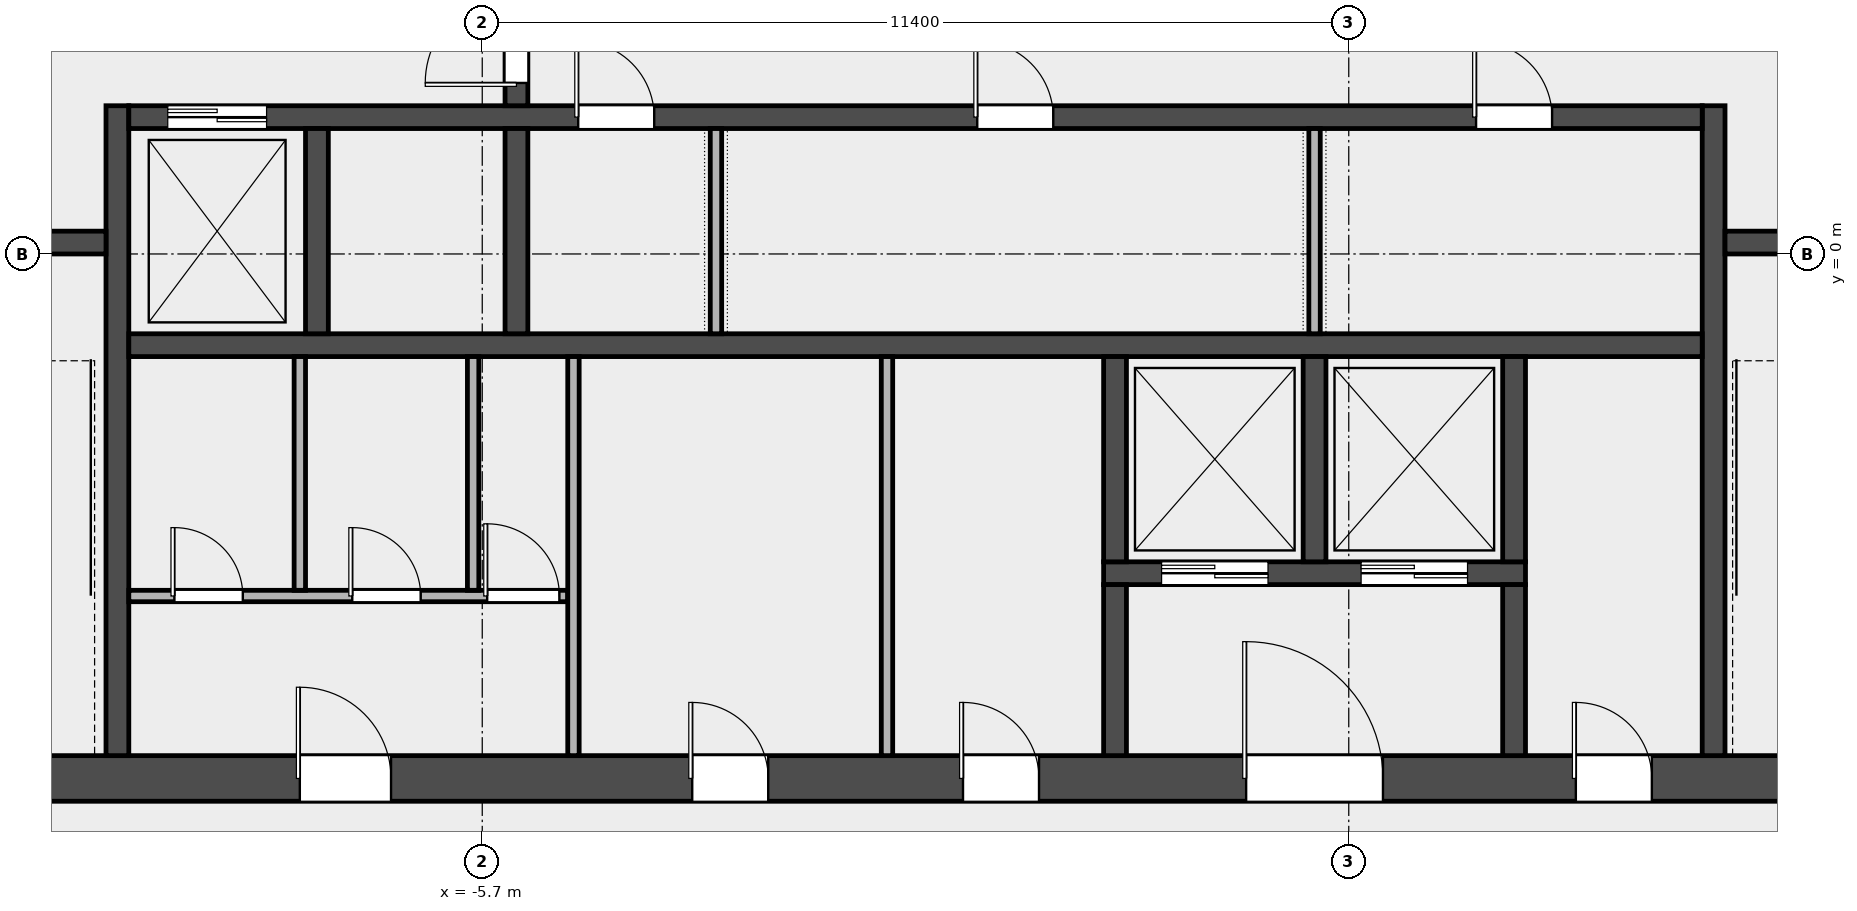
"""IFC4 building model, lengths in metres.
Left out: names, types, materials, properties, quantities, classifications, styles, units other than length and angle.
Written with IfcOpenShell. Run it as: python <this file> out.ifc"""

import sys

from ifc_helpers import new_model, si_unit, direction, frame, frame_2d, origin, place, context, subcontext, project, spatial, rectangle, extrude, element, fill, save


model = new_model("IFC4")
c1 = context("Model", 3, precision=1e-05, world=origin(), true_north=direction((0.0, 1.0)))
c2 = subcontext(c1, "Body", "Model", "MODEL_VIEW")
j1 = project(units=[si_unit("LENGTHUNIT", "METRE"), si_unit("PLANEANGLEUNIT", "RADIAN")], contexts=[c1])
p1 = place(None, origin())
s1 = spatial("IfcSite", under=j1, at=p1, CompositionType="ELEMENT")
p2 = place(p1, origin())
s2 = spatial("IfcBuilding", under=s1, at=p2, CompositionType="ELEMENT")
p3 = place(p2, frame((0.0, 0.0, 283.4)))
s3 = spatial("IfcBuildingStorey", under=s2, at=p3, CompositionType="ELEMENT", Elevation=283.4)
p4 = place(p3, frame((-14.4, -6.9, 0.0), z_axis=(0.0, 0.0, 1.0), x_axis=(1.0, 0.0, 0.0)))
e1 = element("IfcWall", 1, at=p4, inside=s3, PredefinedType="SHEAR", context=c2, shape_type="SweptSolid", body=[
    extrude(rectangle(XDim=28.8, YDim=0.6, at=frame_2d((14.4, 0.0))), origin(), (0.0, 0.0, 1.0), 3.7),
])
p5 = place(p4, frame((6.3, 0.0, 0.0)))
e2 = element("IfcOpeningElement", 2, at=p5, cuts=e1, PredefinedType="OPENING", context=c2, shape_type="SweptSolid", body=[
    extrude(rectangle(XDim=1.2, YDim=2.1, at=frame_2d((0.6, 1.05))), frame((0.0, 0.312, 0.0), z_axis=(0.0, -1.0, 0.0), x_axis=(1.0, 0.0, 0.0)), (0.0, 0.0, 1.0), 0.624),
])
p6 = place(p4, frame((11.462, 0.0, 0.0)))
e3 = element("IfcOpeningElement", 3, at=p6, cuts=e1, PredefinedType="OPENING", context=c2, shape_type="SweptSolid", body=[
    extrude(rectangle(XDim=1.0, YDim=2.1, at=frame_2d((0.5, 1.05))), frame((0.0, 0.312, 0.0), z_axis=(0.0, -1.0, 0.0), x_axis=(1.0, 0.0, 0.0)), (0.0, 0.0, 1.0), 0.624),
])
p7 = place(p4, frame((15.025, 0.0, 0.0)))
e4 = element("IfcOpeningElement", 4, at=p7, cuts=e1, PredefinedType="OPENING", context=c2, shape_type="SweptSolid", body=[
    extrude(rectangle(XDim=1.0, YDim=2.1, at=frame_2d((0.5, 1.05))), frame((0.0, 0.312, 0.0), z_axis=(0.0, -1.0, 0.0), x_axis=(1.0, 0.0, 0.0)), (0.0, 0.0, 1.0), 0.624),
])
p8 = place(p4, frame((18.75, 0.0, 0.0)))
e5 = element("IfcOpeningElement", 5, at=p8, cuts=e1, PredefinedType="OPENING", context=c2, shape_type="SweptSolid", body=[
    extrude(rectangle(XDim=1.8, YDim=2.1, at=frame_2d((0.9, 1.05))), frame((0.0, 0.312, 0.0), z_axis=(0.0, -1.0, 0.0), x_axis=(1.0, 0.0, 0.0)), (0.0, 0.0, 1.0), 0.624),
])
p9 = place(p4, frame((23.087, 0.0, 0.0)))
e6 = element("IfcOpeningElement", 6, at=p9, cuts=e1, PredefinedType="OPENING", context=c2, shape_type="SweptSolid", body=[
    extrude(rectangle(XDim=1.0, YDim=2.1, at=frame_2d((0.5, 1.05))), frame((0.0, 0.312, 0.0), z_axis=(0.0, -1.0, 0.0), x_axis=(1.0, 0.0, 0.0)), (0.0, 0.0, 1.0), 0.624),
])
for number, where, z_axis, x_axis in (
    (7, (-10.5, -6.6, 0.0), (0.0, 0.0, 1.0), (0.0, 1.0, 0.0)),
    (8, (10.5, -6.6, 0.0), (0.0, 0.0, 1.0), (0.0, 1.0, 0.0)),
):
    element("IfcWall", number, at=place(p3, frame(where, z_axis=z_axis, x_axis=x_axis)), inside=s3, PredefinedType="SHEAR", context=c2, shape_type="SweptSolid", body=[
        extrude(rectangle(XDim=8.55, YDim=0.3, at=frame_2d((4.275, 0.0))), origin(), (0.0, 0.0, 1.0), 3.7),
    ])
p10 = place(p3, frame((-13.8, 0.15, 0.0), z_axis=(0.0, 0.0, 1.0), x_axis=(1.0, 0.0, 0.0)))
e9 = element("IfcWall", 9, at=p10, inside=s3, PredefinedType="SOLIDWALL", context=c2, shape_type="SweptSolid", body=[
    extrude(rectangle(XDim=3.15, YDim=0.3, at=frame_2d((1.575, 0.0))), origin(), (0.0, 0.0, 1.0), 3.7),
])
p11 = place(p10, frame((0.975, 0.0, 0.0)))
e10 = element("IfcOpeningElement", 10, at=p11, cuts=e9, PredefinedType="OPENING", context=c2, shape_type="SweptSolid", body=[
    extrude(rectangle(XDim=1.1, YDim=2.1, at=frame_2d((0.55, 1.05))), frame((0.0, 0.162, 0.0), z_axis=(0.0, -1.0, 0.0), x_axis=(1.0, 0.0, 0.0)), (0.0, 0.0, 1.0), 0.324),
])
p12 = place(p3, frame((10.65, 0.15, 0.0), z_axis=(0.0, 0.0, 1.0), x_axis=(1.0, 0.0, 0.0)))
e11 = element("IfcWall", 11, at=p12, inside=s3, PredefinedType="SOLIDWALL", context=c2, shape_type="SweptSolid", body=[
    extrude(rectangle(XDim=3.15, YDim=0.3, at=frame_2d((1.575, 0.0))), origin(), (0.0, 0.0, 1.0), 3.7),
])
p13 = place(p12, frame((1.025, 0.0, 0.0)))
e12 = element("IfcOpeningElement", 12, at=p13, cuts=e11, PredefinedType="OPENING", context=c2, shape_type="SweptSolid", body=[
    extrude(rectangle(XDim=1.1, YDim=2.1, at=frame_2d((0.55, 1.05))), frame((0.0, 0.162, 0.0), z_axis=(0.0, -1.0, 0.0), x_axis=(1.0, 0.0, 0.0)), (0.0, 0.0, 1.0), 0.324),
])
p14 = place(p3, frame((-10.35, -1.2, 0.0), z_axis=(0.0, 0.0, 1.0), x_axis=(1.0, 0.0, 0.0)))
e13 = element("IfcWall", 13, at=p14, inside=s3, PredefinedType="SOLIDWALL", context=c2, shape_type="SweptSolid", body=[
    extrude(rectangle(XDim=20.7, YDim=0.3, at=frame_2d((10.35, 0.0))), origin(), (0.0, 0.0, 1.0), 3.7),
])
p15 = place(p3, frame((-10.35, 1.8, 0.0), z_axis=(0.0, 0.0, 1.0), x_axis=(1.0, 0.0, 0.0)))
e14 = element("IfcWall", 14, at=p15, inside=s3, PredefinedType="SOLIDWALL", context=c2, shape_type="SweptSolid", body=[
    extrude(rectangle(XDim=20.7, YDim=0.3, at=frame_2d((10.35, 0.0))), origin(), (0.0, 0.0, 1.0), 3.7),
])
p16 = place(p15, frame((0.512, 0.0, 0.0)))
e15 = element("IfcOpeningElement", 15, at=p16, cuts=e14, PredefinedType="OPENING", context=c2, shape_type="SweptSolid", body=[
    extrude(rectangle(XDim=1.3, YDim=2.1, at=frame_2d((0.65, 1.05))), frame((0.0, 0.162, 0.0), z_axis=(0.0, -1.0, 0.0), x_axis=(1.0, 0.0, 0.0)), (0.0, 0.0, 1.0), 0.324),
])
p17 = place(p15, frame((5.913, 0.0, 0.0)))
e16 = element("IfcOpeningElement", 16, at=p17, cuts=e14, PredefinedType="OPENING", context=c2, shape_type="SweptSolid", body=[
    extrude(rectangle(XDim=1.0, YDim=2.1, at=frame_2d((0.5, 1.05))), frame((0.0, 0.162, 0.0), z_axis=(0.0, -1.0, 0.0), x_axis=(1.0, 0.0, 0.0)), (0.0, 0.0, 1.0), 0.324),
])
p18 = place(p15, frame((11.163, 0.0, 0.0)))
e17 = element("IfcOpeningElement", 17, at=p18, cuts=e14, PredefinedType="OPENING", context=c2, shape_type="SweptSolid", body=[
    extrude(rectangle(XDim=1.0, YDim=2.1, at=frame_2d((0.5, 1.05))), frame((0.0, 0.162, 0.0), z_axis=(0.0, -1.0, 0.0), x_axis=(1.0, 0.0, 0.0)), (0.0, 0.0, 1.0), 0.324),
])
p19 = place(p15, frame((17.725, 0.0, 0.0)))
e18 = element("IfcOpeningElement", 18, at=p19, cuts=e14, PredefinedType="OPENING", context=c2, shape_type="SweptSolid", body=[
    extrude(rectangle(XDim=1.0, YDim=2.1, at=frame_2d((0.5, 1.05))), frame((0.0, 0.162, 0.0), z_axis=(0.0, -1.0, 0.0), x_axis=(1.0, 0.0, 0.0)), (0.0, 0.0, 1.0), 0.324),
])
for number, where, z_axis, x_axis in (
    (19, (-7.875, -1.05, 0.0), (0.0, 0.0, 1.0), (0.0, 1.0, 0.0)),
    (20, (-5.25, -1.05, 0.0), (0.0, 0.0, 1.0), (0.0, 1.0, 0.0)),
):
    element("IfcWall", number, at=place(p3, frame(where, z_axis=z_axis, x_axis=x_axis)), inside=s3, PredefinedType="SOLIDWALL", context=c2, shape_type="SweptSolid", body=[
        extrude(rectangle(XDim=2.7, YDim=0.3, at=frame_2d((1.35, 0.0))), origin(), (0.0, 0.0, 1.0), 3.7),
    ])
p20 = place(p3, frame((-5.25, 1.95, 0.0), z_axis=(0.0, 0.0, 1.0), x_axis=(0.0, 1.0, 0.0)))
e21 = element("IfcWall", 21, at=p20, inside=s3, PredefinedType="SOLIDWALL", context=c2, shape_type="SweptSolid", body=[
    extrude(rectangle(XDim=3.3, YDim=0.3, at=frame_2d((1.65, 0.0))), origin(), (0.0, 0.0, 1.0), 3.7),
])
p21 = place(p20, frame((0.3, 0.0, 0.0)))
e22 = element("IfcOpeningElement", 22, at=p21, cuts=e21, PredefinedType="OPENING", context=c2, shape_type="SweptSolid", body=[
    extrude(rectangle(XDim=1.2, YDim=2.1, at=frame_2d((0.6, 1.05))), frame((0.0, 0.162, 0.0), z_axis=(0.0, -1.0, 0.0), x_axis=(1.0, 0.0, 0.0)), (0.0, 0.0, 1.0), 0.324),
])
p22 = place(p20, frame((1.8, 0.0, 0.0)))
e23 = element("IfcOpeningElement", 23, at=p22, cuts=e21, PredefinedType="OPENING", context=c2, shape_type="SweptSolid", body=[
    extrude(rectangle(XDim=1.2, YDim=2.1, at=frame_2d((0.6, 1.05))), frame((0.0, 0.162, 0.0), z_axis=(0.0, -1.0, 0.0), x_axis=(1.0, 0.0, 0.0)), (0.0, 0.0, 1.0), 0.324),
])
p23 = place(p3, frame((2.475, -4.2, 0.0), z_axis=(0.0, 0.0, 1.0), x_axis=(1.0, 0.0, 0.0)))
e24 = element("IfcWall", 24, at=p23, inside=s3, PredefinedType="SOLIDWALL", context=c2, shape_type="SweptSolid", body=[
    extrude(rectangle(XDim=5.55, YDim=0.3, at=frame_2d((2.775, 0.0))), origin(), (0.0, 0.0, 1.0), 3.7),
])
p24 = place(p23, frame((0.762, 0.0, 0.0)))
e25 = element("IfcOpeningElement", 25, at=p24, cuts=e24, PredefinedType="OPENING", context=c2, shape_type="SweptSolid", body=[
    extrude(rectangle(XDim=1.4, YDim=2.1, at=frame_2d((0.7, 1.05))), frame((0.0, 0.162, 0.0), z_axis=(0.0, -1.0, 0.0), x_axis=(1.0, 0.0, 0.0)), (0.0, 0.0, 1.0), 0.324),
])
p25 = place(p23, frame((3.387, 0.0, 0.0)))
e26 = element("IfcOpeningElement", 26, at=p25, cuts=e24, PredefinedType="OPENING", context=c2, shape_type="SweptSolid", body=[
    extrude(rectangle(XDim=1.4, YDim=2.1, at=frame_2d((0.7, 1.05))), frame((0.0, 0.162, 0.0), z_axis=(0.0, -1.0, 0.0), x_axis=(1.0, 0.0, 0.0)), (0.0, 0.0, 1.0), 0.324),
])
p26 = place(p3, frame((2.625, -4.05, 0.0), z_axis=(0.0, 0.0, 1.0), x_axis=(0.0, 1.0, 0.0)))
e27 = element("IfcWall", 27, at=p26, inside=s3, PredefinedType="SOLIDWALL", context=c2, shape_type="SweptSolid", body=[
    extrude(rectangle(XDim=2.7, YDim=0.3, at=frame_2d((1.35, 0.0))), origin(), (0.0, 0.0, 1.0), 3.7),
])
p27 = place(p3, frame((2.625, -6.6, 0.0), z_axis=(0.0, 0.0, 1.0), x_axis=(0.0, 1.0, 0.0)))
e28 = element("IfcWall", 28, at=p27, inside=s3, PredefinedType="SOLIDWALL", context=c2, shape_type="SweptSolid", body=[
    extrude(rectangle(XDim=2.25, YDim=0.3, at=frame_2d((1.125, 0.0))), origin(), (0.0, 0.0, 1.0), 3.7),
])
for number, where, z_axis, x_axis in (
    (29, (5.25, -4.05, 0.0), (0.0, 0.0, 1.0), (0.0, 1.0, 0.0)),
    (30, (7.875, -4.05, 0.0), (0.0, 0.0, 1.0), (0.0, 1.0, 0.0)),
):
    element("IfcWall", number, at=place(p3, frame(where, z_axis=z_axis, x_axis=x_axis)), inside=s3, PredefinedType="SOLIDWALL", context=c2, shape_type="SweptSolid", body=[
        extrude(rectangle(XDim=2.7, YDim=0.3, at=frame_2d((1.35, 0.0))), origin(), (0.0, 0.0, 1.0), 3.7),
    ])
p28 = place(p3, frame((7.875, -6.6, 0.0), z_axis=(0.0, 0.0, 1.0), x_axis=(0.0, 1.0, 0.0)))
e31 = element("IfcWall", 31, at=p28, inside=s3, PredefinedType="SOLIDWALL", context=c2, shape_type="SweptSolid", body=[
    extrude(rectangle(XDim=2.25, YDim=0.3, at=frame_2d((1.125, 0.0))), origin(), (0.0, 0.0, 1.0), 3.7),
])
p29 = place(p3, frame((-10.35, -4.5, 0.0), z_axis=(0.0, 0.0, 1.0), x_axis=(1.0, 0.0, 0.0)))
e32 = element("IfcWall", 32, at=p29, inside=s3, PredefinedType="PARTITIONING", context=c2, shape_type="SweptSolid", body=[
    extrude(rectangle(XDim=5.775, YDim=0.15, at=frame_2d((2.888, 0.0))), origin(), (0.0, 0.0, 1.0), 3.7),
])
p30 = place(p29, frame((0.6, 0.0, 0.0)))
e33 = element("IfcOpeningElement", 33, at=p30, cuts=e32, PredefinedType="OPENING", context=c2, shape_type="SweptSolid", body=[
    extrude(rectangle(XDim=0.9, YDim=2.1, at=frame_2d((0.45, 1.05))), frame((0.0, 0.087, 0.0), z_axis=(0.0, -1.0, 0.0), x_axis=(1.0, 0.0, 0.0)), (0.0, 0.0, 1.0), 0.174),
])
p31 = place(p29, frame((2.94, 0.0, 0.0)))
e34 = element("IfcOpeningElement", 34, at=p31, cuts=e32, PredefinedType="OPENING", context=c2, shape_type="SweptSolid", body=[
    extrude(rectangle(XDim=0.9, YDim=2.1, at=frame_2d((0.45, 1.05))), frame((0.0, 0.087, 0.0), z_axis=(0.0, -1.0, 0.0), x_axis=(1.0, 0.0, 0.0)), (0.0, 0.0, 1.0), 0.174),
])
p32 = place(p29, frame((4.715, 0.0, 0.0)))
e35 = element("IfcOpeningElement", 35, at=p32, cuts=e32, PredefinedType="OPENING", context=c2, shape_type="SweptSolid", body=[
    extrude(rectangle(XDim=0.95, YDim=2.1, at=frame_2d((0.475, 1.05))), frame((0.0, 0.087, 0.0), z_axis=(0.0, -1.0, 0.0), x_axis=(1.0, 0.0, 0.0)), (0.0, 0.0, 1.0), 0.174),
])
for number, where, z_axis, x_axis in (
    (36, (-8.1, -4.425, 0.0), (0.0, 0.0, 1.0), (0.0, 1.0, 0.0)),
    (37, (-5.82, -4.425, 0.0), (0.0, 0.0, 1.0), (0.0, 1.0, 0.0)),
):
    element("IfcWall", number, at=place(p3, frame(where, z_axis=z_axis, x_axis=x_axis)), inside=s3, PredefinedType="PARTITIONING", context=c2, shape_type="SweptSolid", body=[
        extrude(rectangle(XDim=3.075, YDim=0.15, at=frame_2d((1.538, 0.0))), origin(), (0.0, 0.0, 1.0), 3.7),
    ])
for number, where, z_axis, x_axis in (
    (38, (-4.5, -6.6, 0.0), (0.0, 0.0, 1.0), (0.0, 1.0, 0.0)),
    (39, (-0.375, -6.6, 0.0), (0.0, 0.0, 1.0), (0.0, 1.0, 0.0)),
):
    element("IfcWall", number, at=place(p3, frame(where, z_axis=z_axis, x_axis=x_axis)), inside=s3, PredefinedType="PARTITIONING", context=c2, shape_type="SweptSolid", body=[
        extrude(rectangle(XDim=5.25, YDim=0.15, at=frame_2d((2.625, 0.0))), origin(), (0.0, 0.0, 1.0), 3.7),
    ])
for number, where, z_axis, x_axis in (
    (40, (-2.625, -1.05, 0.0), (0.0, 0.0, 1.0), (0.0, 1.0, 0.0)),
    (41, (5.25, -1.05, 0.0), (0.0, 0.0, 1.0), (0.0, 1.0, 0.0)),
):
    element("IfcWall", number, at=place(p3, frame(where, z_axis=z_axis, x_axis=x_axis)), inside=s3, PredefinedType="PARTITIONING", context=c2, shape_type="SweptSolid", body=[
        extrude(rectangle(XDim=2.7, YDim=0.15, at=frame_2d((1.35, 0.0))), origin(), (0.0, 0.0, 1.0), 3.7),
    ])
p33 = place(p21, origin())
e42 = element("IfcDoor", 42, at=p33, inside=s3, OperationType="SINGLE_SWING_LEFT", PredefinedType="DOOR", context=c2, shape_type="SweptSolid", body=[
    extrude(rectangle(XDim=1.2, YDim=2.1, at=frame_2d((0.6, 1.05))), frame((0.0, 0.025, 0.0), z_axis=(0.0, -1.0, 0.0), x_axis=(1.0, 0.0, 0.0)), (0.0, 0.0, 1.0), 0.05),
])
fill(e22, e42)
p34 = place(p16, origin())
e43 = element("IfcDoor", 43, at=p34, inside=s3, OperationType="DOUBLE_DOOR_SLIDING", PredefinedType="DOOR", context=c2, shape_type="SweptSolid", body=[
    extrude(rectangle(XDim=1.3, YDim=2.1, at=frame_2d((0.65, 1.05))), frame((0.0, 0.025, 0.0), z_axis=(0.0, -1.0, 0.0), x_axis=(1.0, 0.0, 0.0)), (0.0, 0.0, 1.0), 0.05),
])
fill(e15, e43)
p35 = place(p24, origin())
e44 = element("IfcDoor", 44, at=p35, inside=s3, OperationType="DOUBLE_DOOR_SLIDING", PredefinedType="DOOR", context=c2, shape_type="SweptSolid", body=[
    extrude(rectangle(XDim=1.4, YDim=2.1, at=frame_2d((0.7, 1.05))), frame((0.0, 0.025, 0.0), z_axis=(0.0, -1.0, 0.0), x_axis=(1.0, 0.0, 0.0)), (0.0, 0.0, 1.0), 0.05),
])
fill(e25, e44)
p36 = place(p25, origin())
e45 = element("IfcDoor", 45, at=p36, inside=s3, OperationType="DOUBLE_DOOR_SLIDING", PredefinedType="DOOR", context=c2, shape_type="SweptSolid", body=[
    extrude(rectangle(XDim=1.4, YDim=2.1, at=frame_2d((0.7, 1.05))), frame((0.0, 0.025, 0.0), z_axis=(0.0, -1.0, 0.0), x_axis=(1.0, 0.0, 0.0)), (0.0, 0.0, 1.0), 0.05),
])
fill(e26, e45)
p37 = place(p5, origin())
e46 = element("IfcDoor", 46, at=p37, inside=s3, OperationType="SINGLE_SWING_LEFT", PredefinedType="DOOR", context=c2, shape_type="SweptSolid", body=[
    extrude(rectangle(XDim=1.2, YDim=2.1, at=frame_2d((0.6, 1.05))), frame((0.0, 0.025, 0.0), z_axis=(0.0, -1.0, 0.0), x_axis=(1.0, 0.0, 0.0)), (0.0, 0.0, 1.0), 0.05),
])
fill(e2, e46)
p38 = place(p30, origin())
e47 = element("IfcDoor", 47, at=p38, inside=s3, OperationType="SINGLE_SWING_LEFT", PredefinedType="DOOR", context=c2, shape_type="SweptSolid", body=[
    extrude(rectangle(XDim=0.9, YDim=2.1, at=frame_2d((0.45, 1.05))), frame((0.0, 0.025, 0.0), z_axis=(0.0, -1.0, 0.0), x_axis=(1.0, 0.0, 0.0)), (0.0, 0.0, 1.0), 0.05),
])
fill(e33, e47)
p39 = place(p31, origin())
e48 = element("IfcDoor", 48, at=p39, inside=s3, OperationType="SINGLE_SWING_LEFT", PredefinedType="DOOR", context=c2, shape_type="SweptSolid", body=[
    extrude(rectangle(XDim=0.9, YDim=2.1, at=frame_2d((0.45, 1.05))), frame((0.0, 0.025, 0.0), z_axis=(0.0, -1.0, 0.0), x_axis=(1.0, 0.0, 0.0)), (0.0, 0.0, 1.0), 0.05),
])
fill(e34, e48)
p40 = place(p32, origin())
e49 = element("IfcDoor", 49, at=p40, inside=s3, OperationType="SINGLE_SWING_LEFT", PredefinedType="DOOR", context=c2, shape_type="SweptSolid", body=[
    extrude(rectangle(XDim=0.95, YDim=2.1, at=frame_2d((0.475, 1.05))), frame((0.0, 0.025, 0.0), z_axis=(0.0, -1.0, 0.0), x_axis=(1.0, 0.0, 0.0)), (0.0, 0.0, 1.0), 0.05),
])
fill(e35, e49)
p41 = place(p6, origin())
e50 = element("IfcDoor", 50, at=p41, inside=s3, OperationType="SINGLE_SWING_LEFT", PredefinedType="DOOR", context=c2, shape_type="SweptSolid", body=[
    extrude(rectangle(XDim=1.0, YDim=2.1, at=frame_2d((0.5, 1.05))), frame((0.0, 0.025, 0.0), z_axis=(0.0, -1.0, 0.0), x_axis=(1.0, 0.0, 0.0)), (0.0, 0.0, 1.0), 0.05),
])
fill(e3, e50)
p42 = place(p7, origin())
e51 = element("IfcDoor", 51, at=p42, inside=s3, OperationType="SINGLE_SWING_LEFT", PredefinedType="DOOR", context=c2, shape_type="SweptSolid", body=[
    extrude(rectangle(XDim=1.0, YDim=2.1, at=frame_2d((0.5, 1.05))), frame((0.0, 0.025, 0.0), z_axis=(0.0, -1.0, 0.0), x_axis=(1.0, 0.0, 0.0)), (0.0, 0.0, 1.0), 0.05),
])
fill(e4, e51)
p43 = place(p8, origin())
e52 = element("IfcDoor", 52, at=p43, inside=s3, OperationType="DOUBLE_DOOR_SINGLE_SWING", PredefinedType="DOOR", context=c2, shape_type="SweptSolid", body=[
    extrude(rectangle(XDim=1.8, YDim=2.1, at=frame_2d((0.9, 1.05))), frame((0.0, 0.025, 0.0), z_axis=(0.0, -1.0, 0.0), x_axis=(1.0, 0.0, 0.0)), (0.0, 0.0, 1.0), 0.05),
])
fill(e5, e52)
p44 = place(p9, origin())
e53 = element("IfcDoor", 53, at=p44, inside=s3, OperationType="SINGLE_SWING_LEFT", PredefinedType="DOOR", context=c2, shape_type="SweptSolid", body=[
    extrude(rectangle(XDim=1.0, YDim=2.1, at=frame_2d((0.5, 1.05))), frame((0.0, 0.025, 0.0), z_axis=(0.0, -1.0, 0.0), x_axis=(1.0, 0.0, 0.0)), (0.0, 0.0, 1.0), 0.05),
])
fill(e6, e53)
p45 = place(p17, origin())
e54 = element("IfcDoor", 54, at=p45, inside=s3, OperationType="SINGLE_SWING_LEFT", PredefinedType="DOOR", context=c2, shape_type="SweptSolid", body=[
    extrude(rectangle(XDim=1.0, YDim=2.1, at=frame_2d((0.5, 1.05))), frame((0.0, 0.025, 0.0), z_axis=(0.0, -1.0, 0.0), x_axis=(1.0, 0.0, 0.0)), (0.0, 0.0, 1.0), 0.05),
])
fill(e16, e54)
p46 = place(p18, origin())
e55 = element("IfcDoor", 55, at=p46, inside=s3, OperationType="SINGLE_SWING_LEFT", PredefinedType="DOOR", context=c2, shape_type="SweptSolid", body=[
    extrude(rectangle(XDim=1.0, YDim=2.1, at=frame_2d((0.5, 1.05))), frame((0.0, 0.025, 0.0), z_axis=(0.0, -1.0, 0.0), x_axis=(1.0, 0.0, 0.0)), (0.0, 0.0, 1.0), 0.05),
])
fill(e17, e55)
p47 = place(p19, origin())
e56 = element("IfcDoor", 56, at=p47, inside=s3, OperationType="SINGLE_SWING_LEFT", PredefinedType="DOOR", context=c2, shape_type="SweptSolid", body=[
    extrude(rectangle(XDim=1.0, YDim=2.1, at=frame_2d((0.5, 1.05))), frame((0.0, 0.025, 0.0), z_axis=(0.0, -1.0, 0.0), x_axis=(1.0, 0.0, 0.0)), (0.0, 0.0, 1.0), 0.05),
])
fill(e18, e56)
save(model, sys.argv[1])
